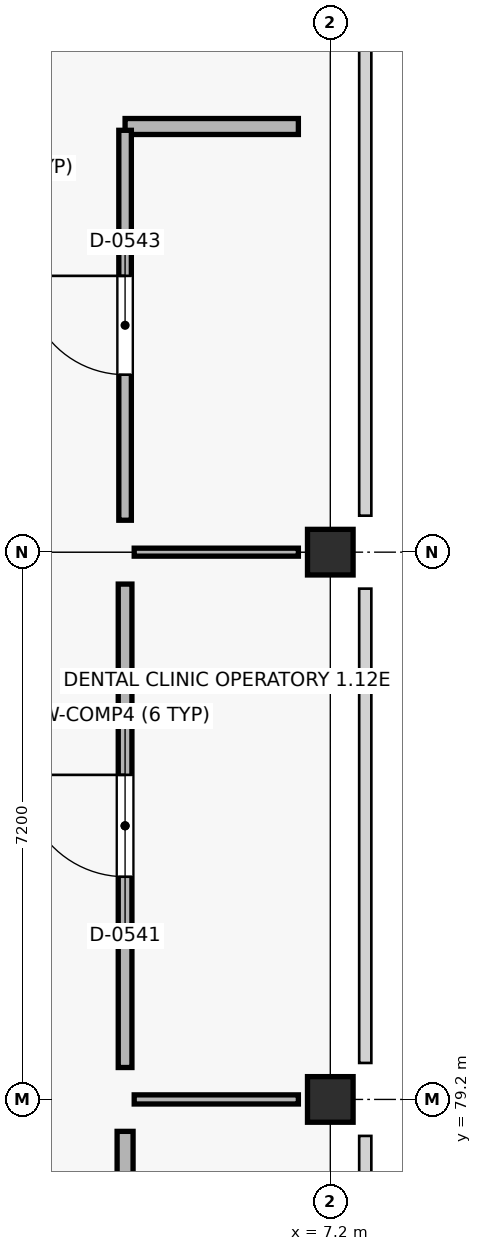
"""IFC4 building model, lengths in metres.
Left out: names, types, materials, properties, quantities, classifications, styles, units other than length and angle.
Written with IfcOpenShell. Run it as: python <this file> out.ifc"""

import sys

from ifc_helpers import new_model, si_unit, direction, frame, frame_2d, origin, origin_2d, place, context, subcontext, project, spatial, rectangle, extrude, element, fill, save


model = new_model("IFC4")
c1 = context("Model", 3, precision=1e-05, world=origin(), true_north=direction((0.0, 1.0)))
c2 = subcontext(c1, "Body", "Model", "MODEL_VIEW")
j1 = project(units=[si_unit("LENGTHUNIT", "METRE"), si_unit("PLANEANGLEUNIT", "RADIAN")], contexts=[c1])
p1 = place(None, origin())
s1 = spatial("IfcSite", under=j1, at=p1, CompositionType="ELEMENT")
p2 = place(p1, origin())
s2 = spatial("IfcBuilding", under=s1, at=p2, CompositionType="ELEMENT")
p3 = place(p2, frame((0.0, 0.0, 13.5)))
s3 = spatial("IfcBuildingStorey", under=s2, at=p3, CompositionType="ELEMENT", Elevation=13.5)
for number, where, z_axis, x_axis in (
    (1, (7.2, 79.2, 0.0), (0.0, 0.0, 1.0), (1.0, 0.0, 0.0)),
    (2, (7.2, 86.4, 0.0), (0.0, 0.0, 1.0), (1.0, 0.0, 0.0)),
):
    element("IfcColumn", number, at=place(p3, frame(where, z_axis=z_axis, x_axis=x_axis)), inside=s3, PredefinedType="COLUMN", context=c2, shape_type="SweptSolid", body=[
        extrude(rectangle(XDim=0.6, YDim=0.6, at=origin_2d()), origin(), (0.0, 0.0, 1.0), 4.05),
    ])
p4 = place(p3, frame((4.5, 72.42, 0.0), z_axis=(0.0, 0.0, 1.0), x_axis=(0.0, 1.0, 0.0)))
e3 = element("IfcWall", 3, at=p4, inside=s3, PredefinedType="PLUMBINGWALL", context=c2, shape_type="SweptSolid", body=[
    extrude(rectangle(XDim=6.36, YDim=0.21, at=frame_2d((3.18, 0.0))), origin(), (0.0, 0.0, 1.0), 2.93),
])
p5 = place(p4, frame((2.55, 0.0, 0.0)))
e4 = element("IfcOpeningElement", 4, at=p5, cuts=e3, PredefinedType="OPENING", context=c2, shape_type="SweptSolid", body=[
    extrude(rectangle(XDim=1.26, YDim=2.14, at=frame_2d((0.63, 1.07))), frame((0.0, 0.115, 0.0), z_axis=(0.0, -1.0, 0.0), x_axis=(1.0, 0.0, 0.0)), (0.0, 0.0, 1.0), 0.23),
])
p6 = place(p3, frame((4.62, 79.2, 0.0), z_axis=(0.0, 0.0, 1.0), x_axis=(1.0, 0.0, 0.0)))
e5 = element("IfcWall", 5, at=p6, inside=s3, PredefinedType="PARTITIONING", context=c2, shape_type="SweptSolid", body=[
    extrude(rectangle(XDim=2.16, YDim=0.12, at=frame_2d((1.08, 0.0))), origin(), (0.0, 0.0, 1.0), 2.93),
])
p7 = place(p3, frame((4.5, 79.62, 0.0), z_axis=(0.0, 0.0, 1.0), x_axis=(0.0, 1.0, 0.0)))
e6 = element("IfcWall", 6, at=p7, inside=s3, PredefinedType="PARTITIONING", context=c2, shape_type="SweptSolid", body=[
    extrude(rectangle(XDim=6.36, YDim=0.18, at=frame_2d((3.18, 0.0))), origin(), (0.0, 0.0, 1.0), 2.93),
])
p8 = place(p7, frame((2.51, 0.0, 0.0)))
e7 = element("IfcOpeningElement", 7, at=p8, cuts=e6, PredefinedType="OPENING", context=c2, shape_type="SweptSolid", body=[
    extrude(rectangle(XDim=1.34, YDim=2.14, at=frame_2d((0.67, 1.07))), frame((0.0, 0.1, 0.0), z_axis=(0.0, -1.0, 0.0), x_axis=(1.0, 0.0, 0.0)), (0.0, 0.0, 1.0), 0.2),
])
p9 = place(p3, frame((4.62, 86.4, 0.0), z_axis=(0.0, 0.0, 1.0), x_axis=(1.0, 0.0, 0.0)))
e8 = element("IfcWall", 8, at=p9, inside=s3, PredefinedType="PARTITIONING", context=c2, shape_type="SweptSolid", body=[
    extrude(rectangle(XDim=2.16, YDim=0.105, at=frame_2d((1.08, 0.0))), origin(), (0.0, 0.0, 1.0), 2.93),
])
p10 = place(p3, frame((4.5, 92.0, 0.0), z_axis=(0.0, 0.0, 1.0), x_axis=(1.0, 0.0, 0.0)))
e9 = element("IfcWall", 9, at=p10, inside=s3, PredefinedType="PLUMBINGWALL", context=c2, shape_type="SweptSolid", body=[
    extrude(rectangle(XDim=2.28, YDim=0.21, at=frame_2d((1.14, 0.0))), origin(), (0.0, 0.0, 1.0), 2.93),
])
p11 = place(p3, frame((4.5, 86.82, 0.0), z_axis=(0.0, 0.0, 1.0), x_axis=(0.0, 1.0, 0.0)))
e10 = element("IfcWall", 10, at=p11, inside=s3, PredefinedType="PARTITIONING", context=c2, shape_type="SweptSolid", body=[
    extrude(rectangle(XDim=5.13, YDim=0.165, at=frame_2d((2.565, 0.0))), origin(), (0.0, 0.0, 1.0), 2.93),
])
p12 = place(p11, frame((1.915, 0.0, 0.0)))
e11 = element("IfcOpeningElement", 11, at=p12, cuts=e10, PredefinedType="OPENING", context=c2, shape_type="SweptSolid", body=[
    extrude(rectangle(XDim=1.3, YDim=2.15, at=frame_2d((0.65, 1.075))), frame((0.0, 0.093, 0.0), z_axis=(0.0, -1.0, 0.0), x_axis=(1.0, 0.0, 0.0)), (0.0, 0.0, 1.0), 0.185),
])
p13 = place(p8, origin())
e12 = element("IfcDoor", 12, at=p13, inside=s3, OperationType="SINGLE_SWING_RIGHT", PredefinedType="DOOR", context=c2, shape_type="SweptSolid", body=[
    extrude(rectangle(XDim=1.34, YDim=2.14, at=frame_2d((0.67, 1.07))), frame((0.0, 0.025, 0.0), z_axis=(0.0, -1.0, 0.0), x_axis=(1.0, 0.0, 0.0)), (0.0, 0.0, 1.0), 0.05),
])
fill(e7, e12)
p14 = place(p12, origin())
e13 = element("IfcDoor", 13, at=p14, inside=s3, OperationType="SINGLE_SWING_RIGHT", PredefinedType="DOOR", context=c2, shape_type="SweptSolid", body=[
    extrude(rectangle(XDim=1.3, YDim=2.15, at=frame_2d((0.65, 1.075))), frame((0.0, 0.025, 0.0), z_axis=(0.0, -1.0, 0.0), x_axis=(1.0, 0.0, 0.0)), (0.0, 0.0, 1.0), 0.05),
])
fill(e11, e13)
save(model, sys.argv[1])
